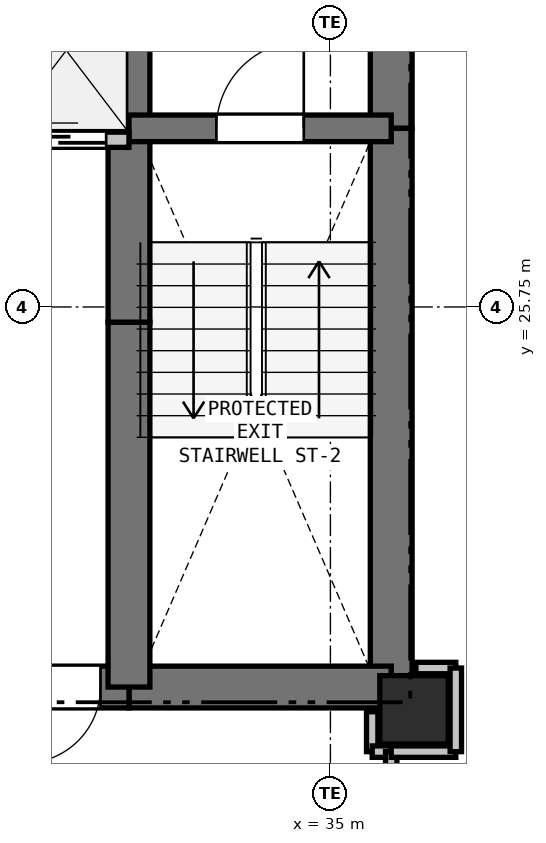
"""IFC4 building model, lengths in metres.
Left out: names, types, materials, properties, quantities, classifications, styles, units other than length and angle.
Written with IfcOpenShell. Run it as: python <this file> out.ifc"""

import sys

from ifc_helpers import new_model, si_unit, direction, frame, frame_2d, origin, origin_2d, place, context, subcontext, project, spatial, rectangle, extrude, element, fill, save


model = new_model("IFC4")
c1 = context("Model", 3, precision=1e-05, world=origin(), true_north=direction((0.0, 1.0)))
c2 = subcontext(c1, "Body", "Model", "MODEL_VIEW")
j1 = project(units=[si_unit("LENGTHUNIT", "METRE"), si_unit("PLANEANGLEUNIT", "RADIAN")], contexts=[c1])
p1 = place(None, origin())
s1 = spatial("IfcSite", under=j1, at=p1, CompositionType="ELEMENT")
p2 = place(p1, origin())
s2 = spatial("IfcBuilding", under=s1, at=p2, CompositionType="ELEMENT")
p3 = place(p2, frame((0.0, 0.0, 35.7)))
s3 = spatial("IfcBuildingStorey", under=s2, at=p3, CompositionType="ELEMENT", Elevation=35.7)
p4 = place(p3, frame((36.1, 20.45, 0.0), z_axis=(0.0, 0.0, 1.0), x_axis=(1.0, 0.0, 0.0)))
e1 = element("IfcColumn", 1, at=p4, inside=s3, PredefinedType="COLUMN", context=c2, shape_type="SweptSolid", body=[
    extrude(rectangle(XDim=0.9, YDim=0.9, at=origin_2d()), origin(), (0.0, 0.0, 1.0), 3.3),
])
p5 = place(p3, frame((35.8, 32.75, 0.0), z_axis=(0.0, 0.0, 1.0), x_axis=(0.0, -1.0, 0.0)))
e2 = element("IfcWall", 2, at=p5, inside=s3, PredefinedType="SHEAR", context=c2, shape_type="SweptSolid", body=[
    extrude(rectangle(XDim=4.65, YDim=0.55, at=frame_2d((2.325, 0.0))), origin(), (0.0, 0.0, 1.0), 3.04),
])
p6 = place(p3, frame((35.8, 28.1, 0.0), z_axis=(0.0, 0.0, 1.0), x_axis=(0.0, -1.0, 0.0)))
e3 = element("IfcWall", 3, at=p6, inside=s3, PredefinedType="SHEAR", context=c2, shape_type="SweptSolid", body=[
    extrude(rectangle(XDim=7.35, YDim=0.55, at=frame_2d((3.675, 0.0))), origin(), (0.0, 0.0, 1.0), 3.04),
])
p7 = place(p3, frame((35.8, 20.75, 0.0), z_axis=(0.0, 0.0, 1.0), x_axis=(-1.0, 0.0, 0.0)))
e4 = element("IfcWall", 4, at=p7, inside=s3, PredefinedType="SHEAR", context=c2, shape_type="SweptSolid", body=[
    extrude(rectangle(XDim=3.45, YDim=0.55, at=frame_2d((1.725, 0.0))), origin(), (0.0, 0.0, 1.0), 3.04),
])
p8 = place(p3, frame((32.35, 20.75, 0.0), z_axis=(0.0, 0.0, 1.0), x_axis=(-1.0, 0.0, 0.0)))
e5 = element("IfcWall", 5, at=p8, inside=s3, PredefinedType="SHEAR", context=c2, shape_type="SweptSolid", body=[
    extrude(rectangle(XDim=1.75, YDim=0.55, at=frame_2d((0.875, 0.0))), origin(), (0.0, 0.0, 1.0), 3.04),
])
p9 = place(p8, frame((0.375, 0.0, 0.0)))
e6 = element("IfcOpeningElement", 6, at=p9, cuts=e5, PredefinedType="OPENING", context=c2, shape_type="SweptSolid", body=[
    extrude(rectangle(XDim=1.0, YDim=2.15, at=frame_2d((0.5, 1.075))), frame((0.0, 0.285, 0.0), z_axis=(0.0, -1.0, 0.0), x_axis=(1.0, 0.0, 0.0)), (0.0, 0.0, 1.0), 0.57),
])
p10 = place(p3, frame((32.35, 20.75, 0.0), z_axis=(0.0, 0.0, 1.0), x_axis=(0.0, 1.0, 0.0)))
e7 = element("IfcWall", 7, at=p10, inside=s3, PredefinedType="SHEAR", context=c2, shape_type="SweptSolid", body=[
    extrude(rectangle(XDim=4.8, YDim=0.55, at=frame_2d((2.4, 0.0))), origin(), (0.0, 0.0, 1.0), 3.04),
])
p11 = place(p3, frame((32.35, 25.55, 0.0), z_axis=(0.0, 0.0, 1.0), x_axis=(0.0, 1.0, 0.0)))
e8 = element("IfcWall", 8, at=p11, inside=s3, PredefinedType="SHEAR", context=c2, shape_type="SweptSolid", body=[
    extrude(rectangle(XDim=2.4, YDim=0.55, at=frame_2d((1.2, 0.0))), origin(), (0.0, 0.0, 1.0), 3.04),
])
p12 = place(p3, frame((32.35, 27.95, 0.0), z_axis=(0.0, 0.0, 1.0), x_axis=(0.0, 1.0, 0.0)))
e9 = element("IfcWall", 9, at=p12, inside=s3, PredefinedType="SHEAR", context=c2, shape_type="SweptSolid", body=[
    extrude(rectangle(XDim=2.8, YDim=0.55, at=frame_2d((1.4, 0.0))), origin(), (0.0, 0.0, 1.0), 3.04),
])
p13 = place(p3, frame((32.35, 28.1, 0.0), z_axis=(0.0, 0.0, 1.0), x_axis=(1.0, 0.0, 0.0)))
e10 = element("IfcWall", 10, at=p13, inside=s3, PredefinedType="SHEAR", context=c2, shape_type="SweptSolid", body=[
    extrude(rectangle(XDim=3.45, YDim=0.35, at=frame_2d((1.725, 0.0))), origin(), (0.0, 0.0, 1.0), 3.04),
])
p14 = place(p13, frame((1.15, 0.0, 0.0)))
e11 = element("IfcOpeningElement", 11, at=p14, cuts=e10, PredefinedType="OPENING", context=c2, shape_type="SweptSolid", body=[
    extrude(rectangle(XDim=1.15, YDim=2.15, at=frame_2d((0.575, 1.075))), frame((0.0, 0.185, 0.0), z_axis=(0.0, -1.0, 0.0), x_axis=(1.0, 0.0, 0.0)), (0.0, 0.0, 1.0), 0.37),
])
p15 = place(p3, frame((27.4, 27.95, 0.0), z_axis=(0.0, 0.0, 1.0), x_axis=(1.0, 0.0, 0.0)))
e12 = element("IfcWall", 12, at=p15, inside=s3, PredefinedType="PARTITIONING", context=c2, shape_type="SweptSolid", body=[
    extrude(rectangle(XDim=4.95, YDim=0.2, at=frame_2d((2.475, 0.0))), origin(), (0.0, 0.0, 1.0), 3.04),
])
p16 = place(p15, frame((0.25, 0.0, 0.0)))
e13 = element("IfcOpeningElement", 13, at=p16, cuts=e12, PredefinedType="OPENING", context=c2, shape_type="SweptSolid", body=[
    extrude(rectangle(XDim=1.1, YDim=2.15, at=frame_2d((0.55, 1.075))), frame((0.0, 0.11, 0.0), z_axis=(0.0, -1.0, 0.0), x_axis=(1.0, 0.0, 0.0)), (0.0, 0.0, 1.0), 0.22),
])
p17 = place(p15, frame((1.9, 0.0, 0.0)))
e14 = element("IfcOpeningElement", 14, at=p17, cuts=e12, PredefinedType="OPENING", context=c2, shape_type="SweptSolid", body=[
    extrude(rectangle(XDim=1.1, YDim=2.15, at=frame_2d((0.55, 1.075))), frame((0.0, 0.11, 0.0), z_axis=(0.0, -1.0, 0.0), x_axis=(1.0, 0.0, 0.0)), (0.0, 0.0, 1.0), 0.22),
])
p18 = place(p15, frame((3.55, 0.0, 0.0)))
e15 = element("IfcOpeningElement", 15, at=p18, cuts=e12, PredefinedType="OPENING", context=c2, shape_type="SweptSolid", body=[
    extrude(rectangle(XDim=1.1, YDim=2.15, at=frame_2d((0.55, 1.075))), frame((0.0, 0.11, 0.0), z_axis=(0.0, -1.0, 0.0), x_axis=(1.0, 0.0, 0.0)), (0.0, 0.0, 1.0), 0.22),
])
p19 = place(p3, frame((35.55, 20.425, 0.0), z_axis=(0.0, 0.0, 1.0), x_axis=(0.0, -1.0, 0.0)))
e16 = element("IfcWall", 16, at=p19, inside=s3, PredefinedType="PARTITIONING", context=c2, shape_type="SweptSolid", body=[
    extrude(rectangle(XDim=0.525, YDim=0.15, at=frame_2d((0.263, 0.0))), origin(), (0.0, 0.0, 1.0), 2.488),
])
p20 = place(p3, frame((35.55, 19.9, 0.0), z_axis=(0.0, 0.0, 1.0), x_axis=(1.0, 0.0, 0.0)))
e17 = element("IfcWall", 17, at=p20, inside=s3, PredefinedType="PARTITIONING", context=c2, shape_type="SweptSolid", body=[
    extrude(rectangle(XDim=0.25, YDim=0.15, at=frame_2d((0.125, 0.0))), origin(), (0.0, 0.0, 1.0), 3.04),
])
p21 = place(p3, frame((35.8, 19.9, 0.0), z_axis=(0.0, 0.0, 1.0), x_axis=(0.0, -1.0, 0.0)))
e18 = element("IfcWall", 18, at=p21, inside=s3, PredefinedType="PARTITIONING", context=c2, shape_type="SweptSolid", body=[
    extrude(rectangle(XDim=1.75, YDim=0.15, at=frame_2d((0.875, 0.0))), origin(), (0.0, 0.0, 1.0), 3.04),
])
p22 = place(p21, frame((0.375, 0.0, 0.0)))
e19 = element("IfcOpeningElement", 19, at=p22, cuts=e18, PredefinedType="OPENING", context=c2, shape_type="SweptSolid", body=[
    extrude(rectangle(XDim=1.0, YDim=2.15, at=frame_2d((0.5, 1.075))), frame((0.0, 0.085, 0.0), z_axis=(0.0, -1.0, 0.0), x_axis=(1.0, 0.0, 0.0)), (0.0, 0.0, 1.0), 0.17),
])
p23 = place(p3, frame((36.65, 21.0, 0.0), z_axis=(0.0, 0.0, 1.0), x_axis=(-1.0, 0.0, 0.0)))
e20 = element("IfcWall", 20, at=p23, inside=s3, PredefinedType="PARTITIONING", context=c2, shape_type="SweptSolid", body=[
    extrude(rectangle(XDim=0.525, YDim=0.15, at=frame_2d((0.262, 0.0))), origin(), (0.0, 0.0, 1.0), 2.488),
])
p24 = place(p3, frame((35.8, 19.9, 0.0), z_axis=(0.0, 0.0, 1.0), x_axis=(1.0, 0.0, 0.0)))
e21 = element("IfcWall", 21, at=p24, inside=s3, PredefinedType="PARTITIONING", context=c2, shape_type="SweptSolid", body=[
    extrude(rectangle(XDim=0.85, YDim=0.15, at=frame_2d((0.425, 0.0))), origin(), (0.0, 0.0, 1.0), 2.338),
])
p25 = place(p3, frame((36.65, 19.9, 0.0), z_axis=(0.0, 0.0, 1.0), x_axis=(0.0, 1.0, 0.0)))
e22 = element("IfcWall", 22, at=p25, inside=s3, PredefinedType="PARTITIONING", context=c2, shape_type="SweptSolid", body=[
    extrude(rectangle(XDim=1.1, YDim=0.15, at=frame_2d((0.55, 0.0))), origin(), (0.0, 0.0, 1.0), 3.04),
])
p26 = place(p18, origin())
e23 = element("IfcDoor", 23, at=p26, inside=s3, OperationType="SLIDING_TO_LEFT", PredefinedType="DOOR", context=c2, shape_type="SweptSolid", body=[
    extrude(rectangle(XDim=1.1, YDim=2.15, at=frame_2d((0.55, 1.075))), frame((0.0, 0.025, 0.0), z_axis=(0.0, -1.0, 0.0), x_axis=(1.0, 0.0, 0.0)), (0.0, 0.0, 1.0), 0.05),
])
fill(e15, e23)
p27 = place(p9, origin())
e24 = element("IfcDoor", 24, at=p27, inside=s3, OperationType="SINGLE_SWING_RIGHT", PredefinedType="DOOR", context=c2, shape_type="SweptSolid", body=[
    extrude(rectangle(XDim=1.0, YDim=2.15, at=frame_2d((0.5, 1.075))), frame((0.0, 0.025, 0.0), z_axis=(0.0, -1.0, 0.0), x_axis=(1.0, 0.0, 0.0)), (0.0, 0.0, 1.0), 0.05),
])
fill(e6, e24)
p28 = place(p14, origin())
e25 = element("IfcDoor", 25, at=p28, inside=s3, OperationType="SINGLE_SWING_RIGHT", PredefinedType="DOOR", context=c2, shape_type="SweptSolid", body=[
    extrude(rectangle(XDim=1.15, YDim=2.15, at=frame_2d((0.575, 1.075))), frame((0.0, 0.025, 0.0), z_axis=(0.0, -1.0, 0.0), x_axis=(1.0, 0.0, 0.0)), (0.0, 0.0, 1.0), 0.05),
])
fill(e11, e25)
save(model, sys.argv[1])
